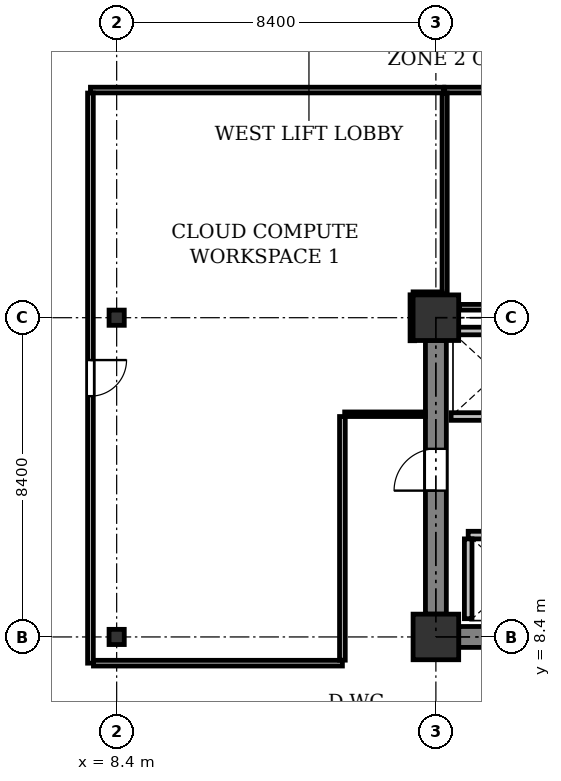
"""IFC4 building model, lengths in metres.
Left out: names, types, materials, properties, quantities, classifications, styles, units other than length and angle.
Written with IfcOpenShell. Run it as: python <this file> out.ifc"""

import sys

from ifc_helpers import new_model, si_unit, direction, frame, frame_2d, origin, origin_2d, place, context, subcontext, project, spatial, rectangle, i_section, extrude, element, fill, save


model = new_model("IFC4")
c1 = context("Model", 3, precision=1e-05, world=origin(), true_north=direction((0.0, 1.0)))
c2 = subcontext(c1, "Body", "Model", "MODEL_VIEW")
j1 = project(units=[si_unit("LENGTHUNIT", "METRE"), si_unit("PLANEANGLEUNIT", "RADIAN")], contexts=[c1])
p1 = place(None, origin())
s1 = spatial("IfcSite", under=j1, at=p1, CompositionType="ELEMENT")
p2 = place(p1, origin())
s2 = spatial("IfcBuilding", under=s1, at=p2, CompositionType="ELEMENT")
p3 = place(p2, frame((0.0, 0.0, 84.4)))
s3 = spatial("IfcBuildingStorey", under=s2, at=p3, CompositionType="ELEMENT", Elevation=84.4)
for number, where, z_axis, x_axis in (
    (1, (8.4, 8.4, 0.0), (0.0, 0.0, 1.0), (1.0, 0.0, 0.0)),
    (2, (8.4, 16.8, 0.0), (0.0, 0.0, 1.0), (1.0, 0.0, 0.0)),
):
    element("IfcColumn", number, at=place(p3, frame(where, z_axis=z_axis, x_axis=x_axis)), inside=s3, PredefinedType="COLUMN", context=c2, shape_type="SweptSolid", body=[
        extrude(i_section(OverallWidth=0.4, OverallDepth=0.4, WebThickness=0.025, FlangeThickness=0.04, at=origin_2d()), origin(), (0.0, 0.0, 1.0), 4.1),
    ])
for number, where, z_axis, x_axis in (
    (3, (16.8, 8.4, 0.0), (0.0, 0.0, 1.0), (1.0, 0.0, 0.0)),
    (4, (16.8, 16.8, 0.0), (0.0, 0.0, 1.0), (1.0, 0.0, 0.0)),
):
    element("IfcColumn", number, at=place(p3, frame(where, z_axis=z_axis, x_axis=x_axis)), inside=s3, PredefinedType="COLUMN", context=c2, shape_type="SweptSolid", body=[
        extrude(rectangle(XDim=1.2, YDim=1.2, at=origin_2d()), origin(), (0.0, 0.0, 1.0), 4.1),
    ])
p4 = place(p3, frame((17.4, 8.4, 0.0), z_axis=(0.0, 0.0, 1.0), x_axis=(1.0, 0.0, 0.0)))
e5 = element("IfcWall", 5, at=p4, inside=s3, PredefinedType="SHEAR", context=c2, shape_type="SweptSolid", body=[
    extrude(rectangle(XDim=7.2, YDim=0.55, at=frame_2d((3.6, 0.0))), origin(), (0.0, 0.0, 1.0), 3.825),
])
p5 = place(p3, frame((16.8, 9.0, 0.0), z_axis=(0.0, 0.0, 1.0), x_axis=(0.0, 1.0, 0.0)))
e6 = element("IfcWall", 6, at=p5, inside=s3, PredefinedType="SHEAR", context=c2, shape_type="SweptSolid", body=[
    extrude(rectangle(XDim=7.2, YDim=0.55, at=frame_2d((3.6, 0.0))), origin(), (0.0, 0.0, 1.0), 3.825),
])
p6 = place(p5, frame((3.25, 0.0, 0.0)))
e7 = element("IfcOpeningElement", 7, at=p6, cuts=e6, PredefinedType="OPENING", context=c2, shape_type="SweptSolid", body=[
    extrude(rectangle(XDim=1.1, YDim=2.15, at=frame_2d((0.55, 1.075))), frame((0.0, 0.285, 0.0), z_axis=(0.0, -1.0, 0.0), x_axis=(1.0, 0.0, 0.0)), (0.0, 0.0, 1.0), 0.57),
])
p7 = place(p3, frame((17.65, 11.08, 0.0), z_axis=(0.0, 0.0, 1.0), x_axis=(1.0, 0.0, 0.0)))
e8 = element("IfcWall", 8, at=p7, inside=s3, PredefinedType="PARTITIONING", context=c2, shape_type="SweptSolid", body=[
    extrude(rectangle(XDim=2.55, YDim=0.2, at=frame_2d((1.275, 0.0))), origin(), (0.0, 0.0, 1.0), 3.825),
])
p8 = place(p7, frame((0.725, 0.0, 0.0)))
e9 = element("IfcOpeningElement", 9, at=p8, cuts=e8, PredefinedType="OPENING", context=c2, shape_type="SweptSolid", body=[
    extrude(rectangle(XDim=1.1, YDim=2.2, at=frame_2d((0.55, 1.1))), frame((0.0, 0.11, 0.0), z_axis=(0.0, -1.0, 0.0), x_axis=(1.0, 0.0, 0.0)), (0.0, 0.0, 1.0), 0.22),
])
p9 = place(p3, frame((17.65, 8.88, 0.0), z_axis=(0.0, 0.0, 1.0), x_axis=(0.0, 1.0, 0.0)))
e10 = element("IfcWall", 10, at=p9, inside=s3, PredefinedType="PARTITIONING", context=c2, shape_type="SweptSolid", body=[
    extrude(rectangle(XDim=2.1, YDim=0.2, at=frame_2d((1.05, 0.0))), origin(), (0.0, 0.0, 1.0), 3.825),
])
p10 = place(p3, frame((17.2, 14.2, 0.0), z_axis=(0.0, 0.0, 1.0), x_axis=(1.0, 0.0, 0.0)))
e11 = element("IfcWall", 11, at=p10, inside=s3, PredefinedType="PARTITIONING", context=c2, shape_type="SweptSolid", body=[
    extrude(rectangle(XDim=2.45, YDim=0.2, at=frame_2d((1.225, 0.0))), origin(), (0.0, 0.0, 1.0), 3.825),
])
p11 = place(p3, frame((17.3, 16.45, 0.0), z_axis=(0.0, 0.0, 1.0), x_axis=(1.0, 0.0, 0.0)))
e12 = element("IfcWall", 12, at=p11, inside=s3, PredefinedType="PARTITIONING", context=c2, shape_type="SweptSolid", body=[
    extrude(rectangle(XDim=2.25, YDim=0.2, at=frame_2d((1.125, 0.0))), origin(), (0.0, 0.0, 1.0), 3.825),
])
p12 = place(p3, frame((34.276, 22.79, 0.0), z_axis=(0.0, 0.0, 1.0), x_axis=(-1.0, 0.0, 0.0)))
e13 = element("IfcWall", 13, at=p12, inside=s3, PredefinedType="PARTITIONING", context=c2, shape_type="SweptSolid", body=[
    extrude(rectangle(XDim=17.245, YDim=0.15, at=frame_2d((8.623, 0.0))), origin(), (0.0, 0.0, 1.0), 3.297),
])
p13 = place(p12, frame((8.148, 0.0, 0.0)))
e14 = element("IfcOpeningElement", 14, at=p13, cuts=e13, PredefinedType="OPENING", context=c2, shape_type="SweptSolid", body=[
    extrude(rectangle(XDim=0.95, YDim=2.15, at=frame_2d((0.475, 1.075))), frame((0.0, 0.085, 0.0), z_axis=(0.0, -1.0, 0.0), x_axis=(1.0, 0.0, 0.0)), (0.0, 0.0, 1.0), 0.17),
])
p14 = place(p3, frame((17.031, 22.711, 0.0), z_axis=(0.0, 0.0, 1.0), x_axis=(0.0, -1.0, 0.0)))
e15 = element("IfcWall", 15, at=p14, inside=s3, PredefinedType="PARTITIONING", context=c2, shape_type="SweptSolid", body=[
    extrude(rectangle(XDim=5.291, YDim=0.135, at=frame_2d((2.646, 0.0))), origin(), (0.0, 0.0, 1.0), 3.825),
])
p15 = place(p3, frame((17.42, 17.075, 0.0), z_axis=(0.0, 0.0, 1.0), x_axis=(1.0, 0.0, 0.0)))
e16 = element("IfcWall", 16, at=p15, inside=s3, PredefinedType="PARTITIONING", context=c2, shape_type="SweptSolid", body=[
    extrude(rectangle(XDim=7.16, YDim=0.15, at=frame_2d((3.58, 0.0))), origin(), (0.0, 0.0, 1.0), 3.469),
])
p16 = place(p3, frame((14.4, 14.26, 0.0), z_axis=(0.0, 0.0, 1.0), x_axis=(1.0, 0.0, 0.0)))
e17 = element("IfcWall", 17, at=p16, inside=s3, PredefinedType="PARTITIONING", context=c2, shape_type="SweptSolid", body=[
    extrude(rectangle(XDim=2.121, YDim=0.12, at=frame_2d((1.061, 0.0))), origin(), (0.0, 0.0, 1.0), 3.825),
])
p17 = place(p3, frame((16.181, 16.194, 0.0), z_axis=(0.0, 0.0, 1.0), x_axis=(-0.000606305467, 0.999999816197, 0.0)))
e18 = element("IfcWall", 18, at=p17, inside=s3, PredefinedType="PARTITIONING", context=c2, shape_type="SweptSolid", body=[
    extrude(rectangle(XDim=1.208, YDim=0.12, at=frame_2d((0.604, 0.0))), origin(), (0.0, 0.0, 1.0), 3.292),
])
p18 = place(p3, frame((16.2, 17.42, 0.0), z_axis=(0.0, 0.0, 1.0), x_axis=(1.0, 0.0, 0.0)))
e19 = element("IfcWall", 19, at=p18, inside=s3, PredefinedType="PARTITIONING", context=c2, shape_type="SweptSolid", body=[
    extrude(rectangle(XDim=0.759, YDim=0.12, at=frame_2d((0.379, 0.0))), origin(), (0.0, 0.0, 1.0), 3.297),
])
p19 = place(p3, frame((17.01, 22.79, 0.0), z_axis=(0.0, 0.0, 1.0), x_axis=(-1.0, 0.0, 0.0)))
e20 = element("IfcWall", 20, at=p19, inside=s3, PredefinedType="PARTITIONING", context=c2, shape_type="SweptSolid", body=[
    extrude(rectangle(XDim=9.301, YDim=0.15, at=frame_2d((4.65, 0.0))), origin(), (0.0, 0.0, 1.0), 3.297),
])
p20 = place(p3, frame((7.71, 22.711, 0.0), z_axis=(0.0, 0.0, 1.0), x_axis=(0.0, -1.0, 0.0)))
e21 = element("IfcWall", 21, at=p20, inside=s3, PredefinedType="PARTITIONING", context=c2, shape_type="SweptSolid", body=[
    extrude(rectangle(XDim=15.001, YDim=0.15, at=frame_2d((7.5, 0.0))), origin(), (0.0, 0.0, 1.0), 3.292),
])
p21 = place(p20, frame((7.025, 0.0, 0.0)))
e22 = element("IfcOpeningElement", 22, at=p21, cuts=e21, PredefinedType="OPENING", context=c2, shape_type="SweptSolid", body=[
    extrude(rectangle(XDim=0.95, YDim=2.15, at=frame_2d((0.475, 1.075))), frame((0.0, 0.085, 0.0), z_axis=(0.0, -1.0, 0.0), x_axis=(1.0, 0.0, 0.0)), (0.0, 0.0, 1.0), 0.17),
])
p22 = place(p3, frame((7.789, 7.71, 0.0), z_axis=(0.0, 0.0, 1.0), x_axis=(1.0, 0.0, 0.0)))
e23 = element("IfcWall", 23, at=p22, inside=s3, PredefinedType="PARTITIONING", context=c2, shape_type="SweptSolid", body=[
    extrude(rectangle(XDim=6.551, YDim=0.15, at=frame_2d((3.275, 0.0))), origin(), (0.0, 0.0, 1.0), 3.297),
])
p23 = place(p3, frame((14.34, 7.789, 0.0), z_axis=(0.0, 0.0, 1.0), x_axis=(0.0, 1.0, 0.0)))
e24 = element("IfcWall", 24, at=p23, inside=s3, PredefinedType="PARTITIONING", context=c2, shape_type="SweptSolid", body=[
    extrude(rectangle(XDim=6.411, YDim=0.15, at=frame_2d((3.206, 0.0))), origin(), (0.0, 0.0, 1.0), 3.292),
])
p24 = place(p6, origin())
e25 = element("IfcDoor", 25, at=p24, inside=s3, OperationType="SINGLE_SWING_LEFT", PredefinedType="DOOR", context=c2, shape_type="SweptSolid", body=[
    extrude(rectangle(XDim=1.1, YDim=2.15, at=frame_2d((0.55, 1.075))), frame((0.0, 0.025, 0.0), z_axis=(0.0, -1.0, 0.0), x_axis=(1.0, 0.0, 0.0)), (0.0, 0.0, 1.0), 0.05),
])
fill(e7, e25)
p25 = place(p21, origin())
e26 = element("IfcDoor", 26, at=p25, inside=s3, OperationType="SINGLE_SWING_LEFT", PredefinedType="DOOR", context=c2, shape_type="SweptSolid", body=[
    extrude(rectangle(XDim=0.95, YDim=2.15, at=frame_2d((0.475, 1.075))), frame((0.0, 0.025, 0.0), z_axis=(0.0, -1.0, 0.0), x_axis=(1.0, 0.0, 0.0)), (0.0, 0.0, 1.0), 0.05),
])
fill(e22, e26)
save(model, sys.argv[1])
